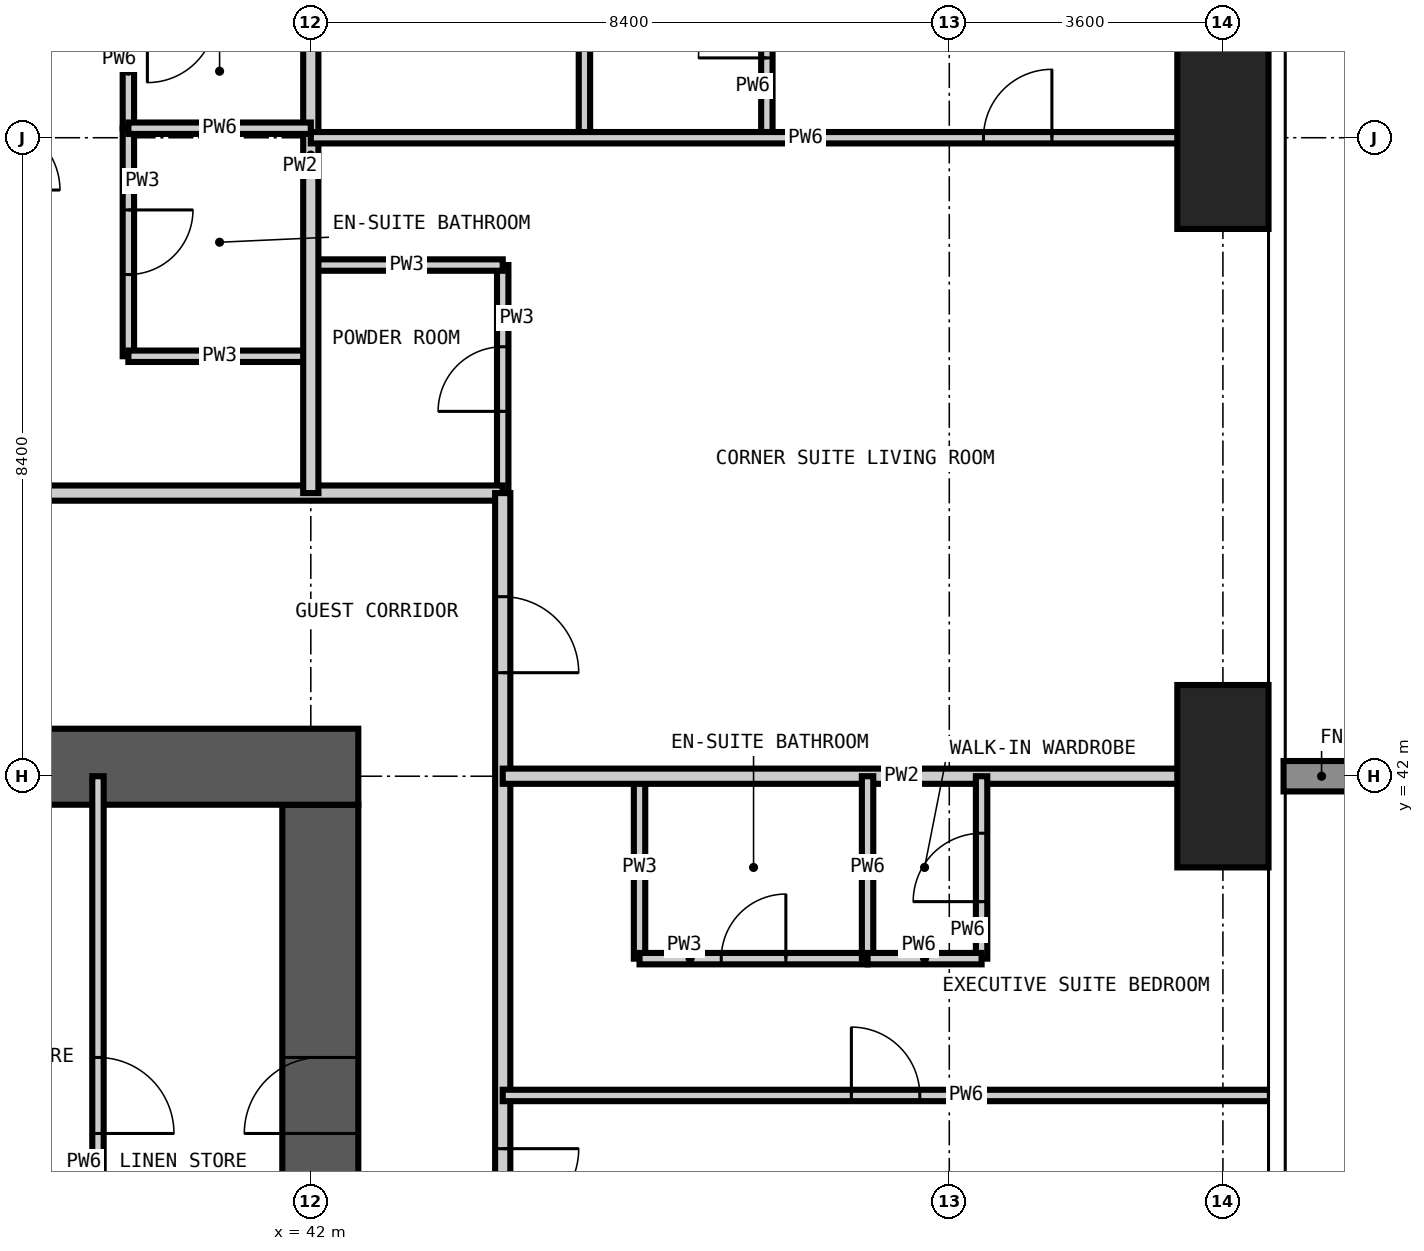
"""IFC4 building model, lengths in metres.
Left out: names, types, materials, properties, quantities, classifications, styles, units other than length and angle.
Written with IfcOpenShell. Run it as: python <this file> out.ifc"""

import sys

from ifc_helpers import new_model, si_unit, direction, frame, frame_2d, origin, origin_2d, place, context, subcontext, project, spatial, rectangle, extrude, element, fill, save


model = new_model("IFC4")
c1 = context("Model", 3, precision=1e-05, world=origin(), true_north=direction((0.0, 1.0)))
c2 = subcontext(c1, "Body", "Model", "MODEL_VIEW")
j1 = project(units=[si_unit("LENGTHUNIT", "METRE"), si_unit("PLANEANGLEUNIT", "RADIAN")], contexts=[c1])
p1 = place(None, origin())
s1 = spatial("IfcSite", under=j1, at=p1, CompositionType="ELEMENT")
p2 = place(p1, origin())
s2 = spatial("IfcBuilding", under=s1, at=p2, CompositionType="ELEMENT")
p3 = place(p2, frame((0.0, 0.0, 122.4)))
s3 = spatial("IfcBuildingStorey", under=s2, at=p3, CompositionType="ELEMENT", Elevation=122.4)
for number, where, z_axis, x_axis in (
    (1, (54.0, 42.0, -0.35), (0.0, 0.0, 1.0), (1.0, 0.0, 0.0)),
    (2, (54.0, 50.4, -0.35), (0.0, 0.0, 1.0), (1.0, 0.0, 0.0)),
):
    element("IfcColumn", number, at=place(p3, frame(where, z_axis=z_axis, x_axis=x_axis)), inside=s3, PredefinedType="COLUMN", context=c2, shape_type="SweptSolid", body=[
        extrude(rectangle(XDim=1.2, YDim=2.4, at=origin_2d()), origin(), (0.0, 0.0, 1.0), 3.6),
    ])
p4 = place(p3, frame((42.125, 17.175, -0.35), z_axis=(0.0, 0.0, 1.0), x_axis=(0.0, 1.0, 0.0)))
e3 = element("IfcWall", 3, at=p4, inside=s3, PredefinedType="SHEAR", context=c2, shape_type="SweptSolid", body=[
    extrude(rectangle(XDim=24.45, YDim=1.0, at=frame_2d((12.225, 0.0))), origin(), (0.0, 0.0, 1.0), 3.6),
])
p5 = place(p4, frame((0.425, 0.0, 0.35)))
e4 = element("IfcOpeningElement", 4, at=p5, cuts=e3, PredefinedType="OPENING", context=c2, shape_type="SweptSolid", body=[
    extrude(rectangle(XDim=1.2, YDim=2.2, at=frame_2d((0.6, 1.1))), frame((0.0, 0.51, 0.0), z_axis=(0.0, -1.0, 0.0), x_axis=(1.0, 0.0, 0.0)), (0.0, 0.0, 1.0), 1.02),
])
p6 = place(p4, frame((11.325, 0.0, 0.35)))
e5 = element("IfcOpeningElement", 5, at=p6, cuts=e3, PredefinedType="OPENING", context=c2, shape_type="SweptSolid", body=[
    extrude(rectangle(XDim=1.8, YDim=2.2, at=frame_2d((0.9, 1.1))), frame((0.0, 0.51, 0.0), z_axis=(0.0, -1.0, 0.0), x_axis=(1.0, 0.0, 0.0)), (0.0, 0.0, 1.0), 1.02),
])
p7 = place(p4, frame((20.125, 0.0, 0.35)))
e6 = element("IfcOpeningElement", 6, at=p7, cuts=e3, PredefinedType="OPENING", context=c2, shape_type="SweptSolid", body=[
    extrude(rectangle(XDim=1.0, YDim=2.1, at=frame_2d((0.5, 1.05))), frame((0.0, 0.51, 0.0), z_axis=(0.0, -1.0, 0.0), x_axis=(1.0, 0.0, 0.0)), (0.0, 0.0, 1.0), 1.02),
])
p8 = place(p3, frame((42.625, 42.125, -0.35), z_axis=(0.0, 0.0, 1.0), x_axis=(-1.0, 0.0, 0.0)))
e7 = element("IfcWall", 7, at=p8, inside=s3, PredefinedType="SHEAR", context=c2, shape_type="SweptSolid", body=[
    extrude(rectangle(XDim=26.45, YDim=1.0, at=frame_2d((13.225, 0.0))), origin(), (0.0, 0.0, 1.0), 3.6),
])
p9 = place(p8, frame((21.125, 0.0, 0.35)))
e8 = element("IfcOpeningElement", 8, at=p9, cuts=e7, PredefinedType="OPENING", context=c2, shape_type="SweptSolid", body=[
    extrude(rectangle(XDim=1.0, YDim=2.1, at=frame_2d((0.5, 1.05))), frame((0.0, 0.51, 0.0), z_axis=(0.0, -1.0, 0.0), x_axis=(1.0, 0.0, 0.0)), (0.0, 0.0, 1.0), 1.02),
])
p10 = place(p8, frame((10.525, 0.0, 0.35)))
e9 = element("IfcOpeningElement", 9, at=p10, cuts=e7, PredefinedType="OPENING", context=c2, shape_type="SweptSolid", body=[
    extrude(rectangle(XDim=1.2, YDim=2.2, at=frame_2d((0.6, 1.1))), frame((0.0, 0.51, 0.0), z_axis=(0.0, -1.0, 0.0), x_axis=(1.0, 0.0, 0.0)), (0.0, 0.0, 1.0), 1.02),
])
p11 = place(p3, frame((39.6, 47.525, 0.0), z_axis=(0.0, 0.0, 1.0), x_axis=(0.0, 1.0, 0.0)))
e10 = element("IfcWall", 10, at=p11, inside=s3, PredefinedType="PARTITIONING", context=c2, shape_type="SweptSolid", body=[
    extrude(rectangle(XDim=3.0, YDim=0.15, at=frame_2d((1.5, 0.0))), origin(), (0.0, 0.0, 1.0), 3.25),
])
p12 = place(p11, frame((1.075, 0.0, 0.0)))
e11 = element("IfcOpeningElement", 11, at=p12, cuts=e10, PredefinedType="OPENING", context=c2, shape_type="SweptSolid", body=[
    extrude(rectangle(XDim=0.85, YDim=2.1, at=frame_2d((0.425, 1.05))), frame((0.0, 0.085, 0.0), z_axis=(0.0, -1.0, 0.0), x_axis=(1.0, 0.0, 0.0)), (0.0, 0.0, 1.0), 0.17),
])
p13 = place(p3, frame((44.525, 45.725, 0.0), z_axis=(0.0, 0.0, 1.0), x_axis=(0.0, 1.0, 0.0)))
e12 = element("IfcWall", 12, at=p13, inside=s3, PredefinedType="PARTITIONING", context=c2, shape_type="SweptSolid", body=[
    extrude(rectangle(XDim=3.0, YDim=0.15, at=frame_2d((1.5, 0.0))), origin(), (0.0, 0.0, 1.0), 3.25),
])
p14 = place(p13, frame((1.075, 0.0, 0.0)))
e13 = element("IfcOpeningElement", 13, at=p14, cuts=e12, PredefinedType="OPENING", context=c2, shape_type="SweptSolid", body=[
    extrude(rectangle(XDim=0.85, YDim=2.1, at=frame_2d((0.425, 1.05))), frame((0.0, 0.085, 0.0), z_axis=(0.0, -1.0, 0.0), x_axis=(1.0, 0.0, 0.0)), (0.0, 0.0, 1.0), 0.17),
])
p15 = place(p3, frame((46.325, 39.6, 0.0), z_axis=(0.0, 0.0, 1.0), x_axis=(0.0, 1.0, 0.0)))
e14 = element("IfcWall", 14, at=p15, inside=s3, PredefinedType="PARTITIONING", context=c2, shape_type="SweptSolid", body=[
    extrude(rectangle(XDim=2.4, YDim=0.15, at=frame_2d((1.2, 0.0))), origin(), (0.0, 0.0, 1.0), 3.25),
])
p16 = place(p3, frame((46.325, 39.6, 0.0), z_axis=(0.0, 0.0, 1.0), x_axis=(1.0, 0.0, 0.0)))
e15 = element("IfcWall", 15, at=p16, inside=s3, PredefinedType="PARTITIONING", context=c2, shape_type="SweptSolid", body=[
    extrude(rectangle(XDim=3.0, YDim=0.15, at=frame_2d((1.5, 0.0))), origin(), (0.0, 0.0, 1.0), 3.25),
])
p17 = place(p16, frame((1.075, 0.0, 0.0)))
e16 = element("IfcOpeningElement", 16, at=p17, cuts=e15, PredefinedType="OPENING", context=c2, shape_type="SweptSolid", body=[
    extrude(rectangle(XDim=0.85, YDim=2.1, at=frame_2d((0.425, 1.05))), frame((0.0, 0.085, 0.0), z_axis=(0.0, -1.0, 0.0), x_axis=(1.0, 0.0, 0.0)), (0.0, 0.0, 1.0), 0.17),
])
p18 = place(p3, frame((39.6, 47.525, 0.0), z_axis=(0.0, 0.0, 1.0), x_axis=(1.0, 0.0, 0.0)))
e17 = element("IfcWall", 17, at=p18, inside=s3, PredefinedType="PARTITIONING", context=c2, shape_type="SweptSolid", body=[
    extrude(rectangle(XDim=2.4, YDim=0.15, at=frame_2d((1.2, 0.0))), origin(), (0.0, 0.0, 1.0), 3.25),
])
p19 = place(p3, frame((42.0, 48.725, 0.0), z_axis=(0.0, 0.0, 1.0), x_axis=(1.0, 0.0, 0.0)))
e18 = element("IfcWall", 18, at=p19, inside=s3, PredefinedType="PARTITIONING", context=c2, shape_type="SweptSolid", body=[
    extrude(rectangle(XDim=2.525, YDim=0.15, at=frame_2d((1.262, 0.0))), origin(), (0.0, 0.0, 1.0), 3.25),
])
p20 = place(p3, frame((12.6, 45.725, 0.0), z_axis=(0.0, 0.0, 1.0), x_axis=(1.0, 0.0, 0.0)))
e19 = element("IfcWall", 19, at=p20, inside=s3, PredefinedType="PARTITIONING", context=c2, shape_type="SweptSolid", body=[
    extrude(rectangle(XDim=31.925, YDim=0.2, at=frame_2d((15.962, 0.0))), origin(), (0.0, 0.0, 1.0), 3.25),
])
p21 = place(p20, frame((6.7, 0.0, 0.0)))
e20 = element("IfcOpeningElement", 20, at=p21, cuts=e19, PredefinedType="OPENING", context=c2, shape_type="SweptSolid", body=[
    extrude(rectangle(XDim=1.0, YDim=2.2, at=frame_2d((0.5, 1.1))), frame((0.0, 0.11, 0.0), z_axis=(0.0, -1.0, 0.0), x_axis=(1.0, 0.0, 0.0)), (0.0, 0.0, 1.0), 0.22),
])
p22 = place(p20, frame((17.5, 0.0, 0.0)))
e21 = element("IfcOpeningElement", 21, at=p22, cuts=e19, PredefinedType="OPENING", context=c2, shape_type="SweptSolid", body=[
    extrude(rectangle(XDim=1.0, YDim=2.2, at=frame_2d((0.5, 1.1))), frame((0.0, 0.11, 0.0), z_axis=(0.0, -1.0, 0.0), x_axis=(1.0, 0.0, 0.0)), (0.0, 0.0, 1.0), 0.22),
])
p23 = place(p20, frame((23.5, 0.0, 0.0)))
e22 = element("IfcOpeningElement", 22, at=p23, cuts=e19, PredefinedType="OPENING", context=c2, shape_type="SweptSolid", body=[
    extrude(rectangle(XDim=1.0, YDim=2.2, at=frame_2d((0.5, 1.1))), frame((0.0, 0.11, 0.0), z_axis=(0.0, -1.0, 0.0), x_axis=(1.0, 0.0, 0.0)), (0.0, 0.0, 1.0), 0.22),
])
p24 = place(p3, frame((44.525, 45.725, 0.0), z_axis=(0.0, 0.0, 1.0), x_axis=(0.0, -1.0, 0.0)))
e23 = element("IfcWall", 23, at=p24, inside=s3, PredefinedType="PARTITIONING", context=c2, shape_type="SweptSolid", body=[
    extrude(rectangle(XDim=32.05, YDim=0.2, at=frame_2d((16.025, 0.0))), origin(), (0.0, 0.0, 1.0), 3.25),
])
p25 = place(p24, frame((25.425, 0.0, 0.0)))
e24 = element("IfcOpeningElement", 24, at=p25, cuts=e23, PredefinedType="OPENING", context=c2, shape_type="SweptSolid", body=[
    extrude(rectangle(XDim=1.0, YDim=2.2, at=frame_2d((0.5, 1.1))), frame((0.0, 0.11, 0.0), z_axis=(0.0, -1.0, 0.0), x_axis=(1.0, 0.0, 0.0)), (0.0, 0.0, 1.0), 0.22),
])
p26 = place(p24, frame((14.625, 0.0, 0.0)))
e25 = element("IfcOpeningElement", 25, at=p26, cuts=e23, PredefinedType="OPENING", context=c2, shape_type="SweptSolid", body=[
    extrude(rectangle(XDim=1.0, YDim=2.2, at=frame_2d((0.5, 1.1))), frame((0.0, 0.11, 0.0), z_axis=(0.0, -1.0, 0.0), x_axis=(1.0, 0.0, 0.0)), (0.0, 0.0, 1.0), 0.22),
])
p27 = place(p24, frame((8.625, 0.0, 0.0)))
e26 = element("IfcOpeningElement", 26, at=p27, cuts=e23, PredefinedType="OPENING", context=c2, shape_type="SweptSolid", body=[
    extrude(rectangle(XDim=1.0, YDim=2.2, at=frame_2d((0.5, 1.1))), frame((0.0, 0.11, 0.0), z_axis=(0.0, -1.0, 0.0), x_axis=(1.0, 0.0, 0.0)), (0.0, 0.0, 1.0), 0.22),
])
p28 = place(p24, frame((29.987, 0.0, 0.0)))
e27 = element("IfcOpeningElement", 27, at=p28, cuts=e23, PredefinedType="OPENING", context=c2, shape_type="SweptSolid", body=[
    extrude(rectangle(XDim=1.0, YDim=2.2, at=frame_2d((0.5, 1.1))), frame((0.0, 0.11, 0.0), z_axis=(0.0, -1.0, 0.0), x_axis=(1.0, 0.0, 0.0)), (0.0, 0.0, 1.0), 0.22),
])
p29 = place(p24, frame((1.363, 0.0, 0.0)))
e28 = element("IfcOpeningElement", 28, at=p29, cuts=e23, PredefinedType="OPENING", context=c2, shape_type="SweptSolid", body=[
    extrude(rectangle(XDim=1.0, YDim=2.2, at=frame_2d((0.5, 1.1))), frame((0.0, 0.11, 0.0), z_axis=(0.0, -1.0, 0.0), x_axis=(1.0, 0.0, 0.0)), (0.0, 0.0, 1.0), 0.22),
])
p30 = place(p3, frame((42.0, 45.725, 0.0), z_axis=(0.0, 0.0, 1.0), x_axis=(0.0, 1.0, 0.0)))
e29 = element("IfcWall", 29, at=p30, inside=s3, PredefinedType="PARTITIONING", context=c2, shape_type="SweptSolid", body=[
    extrude(rectangle(XDim=8.893, YDim=0.2, at=frame_2d((4.446, 0.0))), origin(), (0.0, 0.0, 1.0), 3.25),
])
p31 = place(p3, frame((44.525, 42.0, 0.0), z_axis=(0.0, 0.0, 1.0), x_axis=(1.0, 0.0, 0.0)))
e30 = element("IfcWall", 30, at=p31, inside=s3, PredefinedType="PARTITIONING", context=c2, shape_type="SweptSolid", body=[
    extrude(rectangle(XDim=10.093, YDim=0.2, at=frame_2d((5.046, 0.0))), origin(), (0.0, 0.0, 1.0), 3.25),
])
p32 = place(p3, frame((39.2, 33.6, 0.0), z_axis=(0.0, 0.0, 1.0), x_axis=(0.0, 1.0, 0.0)))
e31 = element("IfcWall", 31, at=p32, inside=s3, PredefinedType="PARTITIONING", context=c2, shape_type="SweptSolid", body=[
    extrude(rectangle(XDim=8.4, YDim=0.15, at=frame_2d((4.2, 0.0))), origin(), (0.0, 0.0, 1.0), 3.25),
])
p33 = place(p32, frame((3.7, 0.0, 0.0)))
e32 = element("IfcOpeningElement", 32, at=p33, cuts=e31, PredefinedType="OPENING", context=c2, shape_type="SweptSolid", body=[
    extrude(rectangle(XDim=1.0, YDim=2.1, at=frame_2d((0.5, 1.05))), frame((0.0, 0.085, 0.0), z_axis=(0.0, -1.0, 0.0), x_axis=(1.0, 0.0, 0.0)), (0.0, 0.0, 1.0), 0.17),
])
p34 = place(p3, frame((39.6, 50.525, 0.0), z_axis=(0.0, 0.0, 1.0), x_axis=(0.0, 1.0, 0.0)))
e33 = element("IfcWall", 33, at=p34, inside=s3, PredefinedType="PARTITIONING", context=c2, shape_type="SweptSolid", body=[
    extrude(rectangle(XDim=1.5, YDim=0.15, at=frame_2d((0.75, 0.0))), origin(), (0.0, 0.0, 1.0), 3.25),
])
p35 = place(p3, frame((45.6, 50.4, 0.0), z_axis=(0.0, 0.0, 1.0), x_axis=(0.0, 1.0, 0.0)))
e34 = element("IfcWall", 34, at=p35, inside=s3, PredefinedType="PARTITIONING", context=c2, shape_type="SweptSolid", body=[
    extrude(rectangle(XDim=3.0, YDim=0.15, at=frame_2d((1.5, 0.0))), origin(), (0.0, 0.0, 1.0), 3.25),
])
p36 = place(p3, frame((48.0, 50.4, 0.0), z_axis=(0.0, 0.0, 1.0), x_axis=(0.0, 1.0, 0.0)))
e35 = element("IfcWall", 35, at=p36, inside=s3, PredefinedType="PARTITIONING", context=c2, shape_type="SweptSolid", body=[
    extrude(rectangle(XDim=3.0, YDim=0.15, at=frame_2d((1.5, 0.0))), origin(), (0.0, 0.0, 1.0), 3.25),
])
p37 = place(p36, frame((1.05, 0.0, 0.0)))
e36 = element("IfcOpeningElement", 36, at=p37, cuts=e35, PredefinedType="OPENING", context=c2, shape_type="SweptSolid", body=[
    extrude(rectangle(XDim=0.9, YDim=2.1, at=frame_2d((0.45, 1.05))), frame((0.0, 0.085, 0.0), z_axis=(0.0, -1.0, 0.0), x_axis=(1.0, 0.0, 0.0)), (0.0, 0.0, 1.0), 0.17),
])
p38 = place(p3, frame((49.325, 39.6, 0.0), z_axis=(0.0, 0.0, 1.0), x_axis=(0.0, 1.0, 0.0)))
e37 = element("IfcWall", 37, at=p38, inside=s3, PredefinedType="PARTITIONING", context=c2, shape_type="SweptSolid", body=[
    extrude(rectangle(XDim=2.4, YDim=0.15, at=frame_2d((1.2, 0.0))), origin(), (0.0, 0.0, 1.0), 3.25),
])
p39 = place(p3, frame((50.825, 39.6, 0.0), z_axis=(0.0, 0.0, 1.0), x_axis=(0.0, 1.0, 0.0)))
e38 = element("IfcWall", 38, at=p39, inside=s3, PredefinedType="PARTITIONING", context=c2, shape_type="SweptSolid", body=[
    extrude(rectangle(XDim=2.4, YDim=0.15, at=frame_2d((1.2, 0.0))), origin(), (0.0, 0.0, 1.0), 3.25),
])
p40 = place(p39, frame((0.75, 0.0, 0.0)))
e39 = element("IfcOpeningElement", 39, at=p40, cuts=e38, PredefinedType="OPENING", context=c2, shape_type="SweptSolid", body=[
    extrude(rectangle(XDim=0.9, YDim=2.1, at=frame_2d((0.45, 1.05))), frame((0.0, 0.085, 0.0), z_axis=(0.0, -1.0, 0.0), x_axis=(1.0, 0.0, 0.0)), (0.0, 0.0, 1.0), 0.17),
])
p41 = place(p3, frame((44.525, 37.8, 0.0), z_axis=(0.0, 0.0, 1.0), x_axis=(1.0, 0.0, 0.0)))
e40 = element("IfcWall", 40, at=p41, inside=s3, PredefinedType="PARTITIONING", context=c2, shape_type="SweptSolid", body=[
    extrude(rectangle(XDim=10.093, YDim=0.15, at=frame_2d((5.046, 0.0))), origin(), (0.0, 0.0, 1.0), 3.25),
])
p42 = place(p41, frame((4.587, 0.0, 0.0)))
e41 = element("IfcOpeningElement", 41, at=p42, cuts=e40, PredefinedType="OPENING", context=c2, shape_type="SweptSolid", body=[
    extrude(rectangle(XDim=0.9, YDim=2.1, at=frame_2d((0.45, 1.05))), frame((0.0, 0.085, 0.0), z_axis=(0.0, -1.0, 0.0), x_axis=(1.0, 0.0, 0.0)), (0.0, 0.0, 1.0), 0.17),
])
p43 = place(p3, frame((49.325, 39.6, 0.0), z_axis=(0.0, 0.0, 1.0), x_axis=(1.0, 0.0, 0.0)))
e42 = element("IfcWall", 42, at=p43, inside=s3, PredefinedType="PARTITIONING", context=c2, shape_type="SweptSolid", body=[
    extrude(rectangle(XDim=1.5, YDim=0.15, at=frame_2d((0.75, 0.0))), origin(), (0.0, 0.0, 1.0), 3.25),
])
p44 = place(p3, frame((42.0, 50.4, 0.0), z_axis=(0.0, 0.0, 1.0), x_axis=(1.0, 0.0, 0.0)))
e43 = element("IfcWall", 43, at=p44, inside=s3, PredefinedType="PARTITIONING", context=c2, shape_type="SweptSolid", body=[
    extrude(rectangle(XDim=12.618, YDim=0.15, at=frame_2d((6.309, 0.0))), origin(), (0.0, 0.0, 1.0), 3.25),
])
p45 = place(p44, frame((8.85, 0.0, 0.0)))
e44 = element("IfcOpeningElement", 44, at=p45, cuts=e43, PredefinedType="OPENING", context=c2, shape_type="SweptSolid", body=[
    extrude(rectangle(XDim=0.9, YDim=2.1, at=frame_2d((0.45, 1.05))), frame((0.0, 0.085, 0.0), z_axis=(0.0, -1.0, 0.0), x_axis=(1.0, 0.0, 0.0)), (0.0, 0.0, 1.0), 0.17),
])
p46 = place(p3, frame((39.6, 50.525, 0.0), z_axis=(0.0, 0.0, 1.0), x_axis=(1.0, 0.0, 0.0)))
e45 = element("IfcWall", 45, at=p46, inside=s3, PredefinedType="PARTITIONING", context=c2, shape_type="SweptSolid", body=[
    extrude(rectangle(XDim=2.4, YDim=0.15, at=frame_2d((1.2, 0.0))), origin(), (0.0, 0.0, 1.0), 3.25),
])
p47 = place(p27, origin())
e46 = element("IfcDoor", 46, at=p47, inside=s3, OperationType="SINGLE_SWING_LEFT", PredefinedType="DOOR", context=c2, shape_type="SweptSolid", body=[
    extrude(rectangle(XDim=1.0, YDim=2.2, at=frame_2d((0.5, 1.1))), frame((0.0, 0.025, 0.0), z_axis=(0.0, -1.0, 0.0), x_axis=(1.0, 0.0, 0.0)), (0.0, 0.0, 1.0), 0.05),
])
fill(e26, e46)
p48 = place(p42, origin())
e47 = element("IfcDoor", 47, at=p48, inside=s3, OperationType="SINGLE_SWING_LEFT", PredefinedType="DOOR", context=c2, shape_type="SweptSolid", body=[
    extrude(rectangle(XDim=0.9, YDim=2.1, at=frame_2d((0.45, 1.05))), frame((0.0, 0.025, 0.0), z_axis=(0.0, -1.0, 0.0), x_axis=(1.0, 0.0, 0.0)), (0.0, 0.0, 1.0), 0.05),
])
fill(e41, e47)
p49 = place(p17, origin())
e48 = element("IfcDoor", 48, at=p49, inside=s3, OperationType="SINGLE_SWING_RIGHT", PredefinedType="DOOR", context=c2, shape_type="SweptSolid", body=[
    extrude(rectangle(XDim=0.85, YDim=2.1, at=frame_2d((0.425, 1.05))), frame((0.0, 0.025, 0.0), z_axis=(0.0, -1.0, 0.0), x_axis=(1.0, 0.0, 0.0)), (0.0, 0.0, 1.0), 0.05),
])
fill(e16, e48)
p50 = place(p40, origin())
e49 = element("IfcDoor", 49, at=p50, inside=s3, OperationType="SINGLE_SWING_LEFT", PredefinedType="DOOR", context=c2, shape_type="SweptSolid", body=[
    extrude(rectangle(XDim=0.9, YDim=2.1, at=frame_2d((0.45, 1.05))), frame((0.0, 0.025, 0.0), z_axis=(0.0, -1.0, 0.0), x_axis=(1.0, 0.0, 0.0)), (0.0, 0.0, 1.0), 0.05),
])
fill(e39, e49)
p51 = place(p12, frame((0.85, 0.0, 0.0), z_axis=(0.0, 0.0, 1.0), x_axis=(-1.0, 0.0, 0.0)))
e50 = element("IfcDoor", 50, at=p51, inside=s3, OperationType="SINGLE_SWING_LEFT", PredefinedType="DOOR", context=c2, shape_type="SweptSolid", body=[
    extrude(rectangle(XDim=0.85, YDim=2.1, at=frame_2d((0.425, 1.05))), frame((0.0, 0.025, 0.0), z_axis=(0.0, -1.0, 0.0), x_axis=(1.0, 0.0, 0.0)), (0.0, 0.0, 1.0), 0.05),
])
fill(e11, e50)
p52 = place(p29, origin())
e51 = element("IfcDoor", 51, at=p52, inside=s3, OperationType="SINGLE_SWING_RIGHT", PredefinedType="DOOR", context=c2, shape_type="SweptSolid", body=[
    extrude(rectangle(XDim=1.0, YDim=2.2, at=frame_2d((0.5, 1.1))), frame((0.0, 0.025, 0.0), z_axis=(0.0, -1.0, 0.0), x_axis=(1.0, 0.0, 0.0)), (0.0, 0.0, 1.0), 0.05),
])
fill(e28, e51)
p53 = place(p14, origin())
e52 = element("IfcDoor", 52, at=p53, inside=s3, OperationType="SINGLE_SWING_LEFT", PredefinedType="DOOR", context=c2, shape_type="SweptSolid", body=[
    extrude(rectangle(XDim=0.85, YDim=2.1, at=frame_2d((0.425, 1.05))), frame((0.0, 0.025, 0.0), z_axis=(0.0, -1.0, 0.0), x_axis=(1.0, 0.0, 0.0)), (0.0, 0.0, 1.0), 0.05),
])
fill(e13, e52)
p54 = place(p45, origin())
e53 = element("IfcDoor", 53, at=p54, inside=s3, OperationType="SINGLE_SWING_RIGHT", PredefinedType="DOOR", context=c2, shape_type="SweptSolid", body=[
    extrude(rectangle(XDim=0.9, YDim=2.1, at=frame_2d((0.45, 1.05))), frame((0.0, 0.025, 0.0), z_axis=(0.0, -1.0, 0.0), x_axis=(1.0, 0.0, 0.0)), (0.0, 0.0, 1.0), 0.05),
])
fill(e44, e53)
p55 = place(p37, origin())
e54 = element("IfcDoor", 54, at=p55, inside=s3, OperationType="SINGLE_SWING_LEFT", PredefinedType="DOOR", context=c2, shape_type="SweptSolid", body=[
    extrude(rectangle(XDim=0.9, YDim=2.1, at=frame_2d((0.45, 1.05))), frame((0.0, 0.025, 0.0), z_axis=(0.0, -1.0, 0.0), x_axis=(1.0, 0.0, 0.0)), (0.0, 0.0, 1.0), 0.05),
])
fill(e36, e54)
p56 = place(p7, origin())
e55 = element("IfcDoor", 55, at=p56, inside=s3, OperationType="SINGLE_SWING_LEFT", PredefinedType="DOOR", context=c2, shape_type="SweptSolid", body=[
    extrude(rectangle(XDim=1.0, YDim=2.1, at=frame_2d((0.5, 1.05))), frame((0.0, 0.025, 0.0), z_axis=(0.0, -1.0, 0.0), x_axis=(1.0, 0.0, 0.0)), (0.0, 0.0, 1.0), 0.05),
])
fill(e6, e55)
p57 = place(p33, frame((1.0, 0.0, 0.0), z_axis=(0.0, 0.0, 1.0), x_axis=(-1.0, 0.0, 0.0)))
e56 = element("IfcDoor", 56, at=p57, inside=s3, OperationType="SINGLE_SWING_RIGHT", PredefinedType="DOOR", context=c2, shape_type="SweptSolid", body=[
    extrude(rectangle(XDim=1.0, YDim=2.1, at=frame_2d((0.5, 1.05))), frame((0.0, 0.025, 0.0), z_axis=(0.0, -1.0, 0.0), x_axis=(1.0, 0.0, 0.0)), (0.0, 0.0, 1.0), 0.05),
])
fill(e32, e56)
save(model, sys.argv[1])
